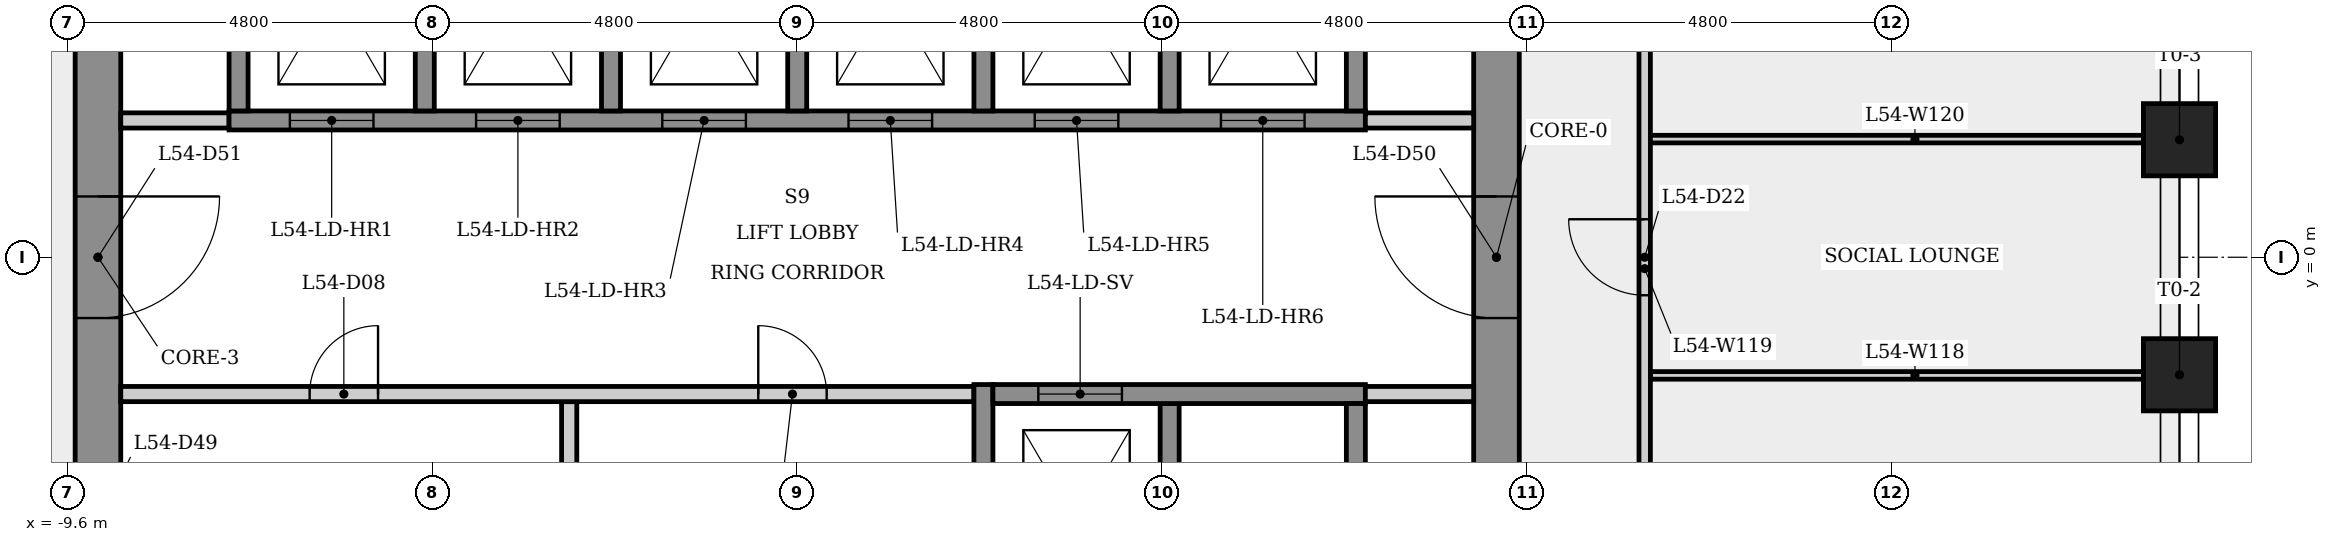
"""IFC4 building model, lengths in metres.
Left out: names, types, materials, properties, quantities, classifications, styles, units other than length and angle.
Written with IfcOpenShell. Run it as: python <this file> out.ifc"""

import sys

from ifc_helpers import new_model, si_unit, direction, frame, frame_2d, origin, origin_2d, place, context, subcontext, project, spatial, rectangle, extrude, element, fill, save


model = new_model("IFC4")
c1 = context("Model", 3, precision=1e-05, world=origin(), true_north=direction((0.0, 1.0)))
c2 = subcontext(c1, "Body", "Model", "MODEL_VIEW")
j1 = project(units=[si_unit("LENGTHUNIT", "METRE"), si_unit("PLANEANGLEUNIT", "RADIAN")], contexts=[c1])
p1 = place(None, origin())
s1 = spatial("IfcSite", under=j1, at=p1, CompositionType="ELEMENT")
p2 = place(p1, origin())
s2 = spatial("IfcBuilding", under=s1, at=p2, CompositionType="ELEMENT")
p3 = place(p2, frame((0.0, 0.0, 202.1)))
s3 = spatial("IfcBuildingStorey", under=s2, at=p3, CompositionType="ELEMENT", Elevation=202.1)
p4 = place(p3, frame((9.2, -5.485, 0.0), z_axis=(0.0, 0.0, 1.0), x_axis=(0.0, 1.0, 0.0)))
e1 = element("IfcWall", 1, at=p4, inside=s3, PredefinedType="SHEAR", context=c2, shape_type="SweptSolid", body=[
    extrude(rectangle(XDim=10.97, YDim=0.6, at=frame_2d((5.485, 0.0))), origin(), (0.0, 0.0, 1.0), 4.0),
])
p5 = place(p4, frame((4.685, 0.0, 0.0)))
e2 = element("IfcOpeningElement", 2, at=p5, cuts=e1, PredefinedType="OPENING", context=c2, shape_type="SweptSolid", body=[
    extrude(rectangle(XDim=1.6, YDim=2.1, at=frame_2d((0.8, 1.05))), frame((0.0, 0.31, 0.0), z_axis=(0.0, -1.0, 0.0), x_axis=(1.0, 0.0, 0.0)), (0.0, 0.0, 1.0), 0.62),
])
p6 = place(p3, frame((-9.2, 5.485, 0.0), z_axis=(0.0, 0.0, 1.0), x_axis=(0.0, -1.0, 0.0)))
e3 = element("IfcWall", 3, at=p6, inside=s3, PredefinedType="SHEAR", context=c2, shape_type="SweptSolid", body=[
    extrude(rectangle(XDim=10.97, YDim=0.6, at=frame_2d((5.485, 0.0))), origin(), (0.0, 0.0, 1.0), 4.0),
])
p7 = place(p6, frame((8.516, 0.0, 0.0)))
e4 = element("IfcOpeningElement", 4, at=p7, cuts=e3, PredefinedType="OPENING", context=c2, shape_type="SweptSolid", body=[
    extrude(rectangle(XDim=0.9, YDim=2.1, at=frame_2d((0.45, 1.05))), frame((0.0, 0.31, 0.0), z_axis=(0.0, -1.0, 0.0), x_axis=(1.0, 0.0, 0.0)), (0.0, 0.0, 1.0), 0.62),
])
p8 = place(p6, frame((4.685, 0.0, 0.0)))
e5 = element("IfcOpeningElement", 5, at=p8, cuts=e3, PredefinedType="OPENING", context=c2, shape_type="SweptSolid", body=[
    extrude(rectangle(XDim=1.6, YDim=2.1, at=frame_2d((0.8, 1.05))), frame((0.0, 0.31, 0.0), z_axis=(0.0, -1.0, 0.0), x_axis=(1.0, 0.0, 0.0)), (0.0, 0.0, 1.0), 0.62),
])
for number, where, z_axis, x_axis in (
    (6, (18.187, -1.546, 0.0), (0.0, 0.0, 1.0), (1.0, 0.0, 0.0)),
    (7, (18.187, 1.546, 0.0), (0.0, 0.0, 1.0), (1.0, 0.0, 0.0)),
):
    element("IfcColumn", number, at=place(p3, frame(where, z_axis=z_axis, x_axis=x_axis)), inside=s3, PredefinedType="COLUMN", context=c2, shape_type="SweptSolid", body=[
        extrude(rectangle(XDim=0.95, YDim=0.95, at=origin_2d()), origin(), (0.0, 0.0, 1.0), 4.0),
    ])
p9 = place(p3, frame((-8.9, 1.8, 0.0), z_axis=(0.0, 0.0, 1.0), x_axis=(1.0, 0.0, 0.0)))
e8 = element("IfcWall", 8, at=p9, inside=s3, PredefinedType="PARTITIONING", context=c2, shape_type="SweptSolid", body=[
    extrude(rectangle(XDim=1.425, YDim=0.2, at=frame_2d((0.712, 0.0))), origin(), (0.0, 0.0, 1.0), 3.6),
])
p10 = place(p3, frame((-7.475, 1.8, 0.0), z_axis=(0.0, 0.0, 1.0), x_axis=(1.0, 0.0, 0.0)))
e9 = element("IfcWall", 9, at=p10, inside=s3, PredefinedType="SHEAR", context=c2, shape_type="SweptSolid", body=[
    extrude(rectangle(XDim=14.95, YDim=0.25, at=frame_2d((7.475, 0.0))), origin(), (0.0, 0.0, 1.0), 3.6),
])
p11 = place(p10, frame((0.8, 0.0, 0.0)))
e10 = element("IfcOpeningElement", 10, at=p11, cuts=e9, PredefinedType="OPENING", context=c2, shape_type="SweptSolid", body=[
    extrude(rectangle(XDim=1.1, YDim=2.1, at=frame_2d((0.55, 1.05))), frame((0.0, 0.135, 0.0), z_axis=(0.0, -1.0, 0.0), x_axis=(1.0, 0.0, 0.0)), (0.0, 0.0, 1.0), 0.27),
])
p12 = place(p10, frame((3.25, 0.0, 0.0)))
e11 = element("IfcOpeningElement", 11, at=p12, cuts=e9, PredefinedType="OPENING", context=c2, shape_type="SweptSolid", body=[
    extrude(rectangle(XDim=1.1, YDim=2.1, at=frame_2d((0.55, 1.05))), frame((0.0, 0.135, 0.0), z_axis=(0.0, -1.0, 0.0), x_axis=(1.0, 0.0, 0.0)), (0.0, 0.0, 1.0), 0.27),
])
p13 = place(p10, frame((5.7, 0.0, 0.0)))
e12 = element("IfcOpeningElement", 12, at=p13, cuts=e9, PredefinedType="OPENING", context=c2, shape_type="SweptSolid", body=[
    extrude(rectangle(XDim=1.1, YDim=2.1, at=frame_2d((0.55, 1.05))), frame((0.0, 0.135, 0.0), z_axis=(0.0, -1.0, 0.0), x_axis=(1.0, 0.0, 0.0)), (0.0, 0.0, 1.0), 0.27),
])
p14 = place(p10, frame((8.15, 0.0, 0.0)))
e13 = element("IfcOpeningElement", 13, at=p14, cuts=e9, PredefinedType="OPENING", context=c2, shape_type="SweptSolid", body=[
    extrude(rectangle(XDim=1.1, YDim=2.1, at=frame_2d((0.55, 1.05))), frame((0.0, 0.135, 0.0), z_axis=(0.0, -1.0, 0.0), x_axis=(1.0, 0.0, 0.0)), (0.0, 0.0, 1.0), 0.27),
])
p15 = place(p10, frame((10.6, 0.0, 0.0)))
e14 = element("IfcOpeningElement", 14, at=p15, cuts=e9, PredefinedType="OPENING", context=c2, shape_type="SweptSolid", body=[
    extrude(rectangle(XDim=1.1, YDim=2.1, at=frame_2d((0.55, 1.05))), frame((0.0, 0.135, 0.0), z_axis=(0.0, -1.0, 0.0), x_axis=(1.0, 0.0, 0.0)), (0.0, 0.0, 1.0), 0.27),
])
p16 = place(p10, frame((13.05, 0.0, 0.0)))
e15 = element("IfcOpeningElement", 15, at=p16, cuts=e9, PredefinedType="OPENING", context=c2, shape_type="SweptSolid", body=[
    extrude(rectangle(XDim=1.1, YDim=2.1, at=frame_2d((0.55, 1.05))), frame((0.0, 0.135, 0.0), z_axis=(0.0, -1.0, 0.0), x_axis=(1.0, 0.0, 0.0)), (0.0, 0.0, 1.0), 0.27),
])
p17 = place(p3, frame((-7.35, 1.925, 0.0), z_axis=(0.0, 0.0, 1.0), x_axis=(0.0, 1.0, 0.0)))
e16 = element("IfcWall", 16, at=p17, inside=s3, PredefinedType="SHEAR", context=c2, shape_type="SweptSolid", body=[
    extrude(rectangle(XDim=4.036, YDim=0.25, at=frame_2d((2.018, 0.0))), origin(), (0.0, 0.0, 1.0), 3.6),
])
p18 = place(p3, frame((-4.9, 5.025, 0.0), z_axis=(0.0, 0.0, 1.0), x_axis=(0.0, -1.0, 0.0)))
e17 = element("IfcWall", 17, at=p18, inside=s3, PredefinedType="SHEAR", context=c2, shape_type="SweptSolid", body=[
    extrude(rectangle(XDim=3.1, YDim=0.25, at=frame_2d((1.55, 0.0))), origin(), (0.0, 0.0, 1.0), 4.0),
])
p19 = place(p3, frame((-3.0, -1.9, 0.0), z_axis=(0.0, 0.0, 1.0), x_axis=(0.0, -1.0, 0.0)))
e18 = element("IfcWall", 18, at=p19, inside=s3, PredefinedType="PARTITIONING", context=c2, shape_type="SweptSolid", body=[
    extrude(rectangle(XDim=3.15, YDim=0.2, at=frame_2d((1.575, 0.0))), origin(), (0.0, 0.0, 1.0), 3.6),
])
p20 = place(p3, frame((-8.9, -1.8, 0.0), z_axis=(0.0, 0.0, 1.0), x_axis=(1.0, 0.0, 0.0)))
e19 = element("IfcWall", 19, at=p20, inside=s3, PredefinedType="PARTITIONING", context=c2, shape_type="SweptSolid", body=[
    extrude(rectangle(XDim=11.225, YDim=0.2, at=frame_2d((5.613, 0.0))), origin(), (0.0, 0.0, 1.0), 3.6),
])
p21 = place(p20, frame((2.485, 0.0, 0.0)))
e20 = element("IfcOpeningElement", 20, at=p21, cuts=e19, PredefinedType="OPENING", context=c2, shape_type="SweptSolid", body=[
    extrude(rectangle(XDim=0.9, YDim=2.1, at=frame_2d((0.45, 1.05))), frame((0.0, 0.11, 0.0), z_axis=(0.0, -1.0, 0.0), x_axis=(1.0, 0.0, 0.0)), (0.0, 0.0, 1.0), 0.22),
])
p22 = place(p20, frame((8.387, 0.0, 0.0)))
e21 = element("IfcOpeningElement", 21, at=p22, cuts=e19, PredefinedType="OPENING", context=c2, shape_type="SweptSolid", body=[
    extrude(rectangle(XDim=0.9, YDim=2.1, at=frame_2d((0.45, 1.05))), frame((0.0, 0.11, 0.0), z_axis=(0.0, -1.0, 0.0), x_axis=(1.0, 0.0, 0.0)), (0.0, 0.0, 1.0), 0.22),
])
for number, where, z_axis, x_axis in (
    (22, (-2.45, 5.025, 0.0), (0.0, 0.0, 1.0), (0.0, -1.0, 0.0)),
    (23, (0.0, 5.025, 0.0), (0.0, 0.0, 1.0), (0.0, -1.0, 0.0)),
):
    element("IfcWall", number, at=place(p3, frame(where, z_axis=z_axis, x_axis=x_axis)), inside=s3, PredefinedType="SHEAR", context=c2, shape_type="SweptSolid", body=[
        extrude(rectangle(XDim=3.1, YDim=0.25, at=frame_2d((1.55, 0.0))), origin(), (0.0, 0.0, 1.0), 4.0),
    ])
p23 = place(p3, frame((2.45, -5.275, 0.0), z_axis=(0.0, 0.0, 1.0), x_axis=(0.0, 1.0, 0.0)))
e24 = element("IfcWall", 24, at=p23, inside=s3, PredefinedType="SHEAR", context=c2, shape_type="SweptSolid", body=[
    extrude(rectangle(XDim=3.6, YDim=0.25, at=frame_2d((1.8, 0.0))), origin(), (0.0, 0.0, 1.0), 3.6),
])
for number, where, z_axis, x_axis in (
    (25, (2.45, 5.025, 0.0), (0.0, 0.0, 1.0), (0.0, -1.0, 0.0)),
    (26, (4.9, -1.925, 0.0), (0.0, 0.0, 1.0), (0.0, -1.0, 0.0)),
    (27, (4.9, 5.025, 0.0), (0.0, 0.0, 1.0), (0.0, -1.0, 0.0)),
):
    element("IfcWall", number, at=place(p3, frame(where, z_axis=z_axis, x_axis=x_axis)), inside=s3, PredefinedType="SHEAR", context=c2, shape_type="SweptSolid", body=[
        extrude(rectangle(XDim=3.1, YDim=0.25, at=frame_2d((1.55, 0.0))), origin(), (0.0, 0.0, 1.0), 4.0),
    ])
p24 = place(p3, frame((2.575, -1.8, 0.0), z_axis=(0.0, 0.0, 1.0), x_axis=(1.0, 0.0, 0.0)))
e28 = element("IfcWall", 28, at=p24, inside=s3, PredefinedType="SHEAR", context=c2, shape_type="SweptSolid", body=[
    extrude(rectangle(XDim=4.9, YDim=0.25, at=frame_2d((2.45, 0.0))), origin(), (0.0, 0.0, 1.0), 3.6),
])
p25 = place(p24, frame((0.597, 0.0, 0.0)))
e29 = element("IfcOpeningElement", 29, at=p25, cuts=e28, PredefinedType="OPENING", context=c2, shape_type="SweptSolid", body=[
    extrude(rectangle(XDim=1.1, YDim=2.1, at=frame_2d((0.55, 1.05))), frame((0.0, 0.135, 0.0), z_axis=(0.0, -1.0, 0.0), x_axis=(1.0, 0.0, 0.0)), (0.0, 0.0, 1.0), 0.27),
])
p26 = place(p3, frame((7.475, 1.8, 0.0), z_axis=(0.0, 0.0, 1.0), x_axis=(1.0, 0.0, 0.0)))
e30 = element("IfcWall", 30, at=p26, inside=s3, PredefinedType="PARTITIONING", context=c2, shape_type="SweptSolid", body=[
    extrude(rectangle(XDim=1.425, YDim=0.2, at=frame_2d((0.712, 0.0))), origin(), (0.0, 0.0, 1.0), 3.6),
])
for number, where, z_axis, x_axis in (
    (31, (7.35, -1.925, 0.0), (0.0, 0.0, 1.0), (0.0, -1.0, 0.0)),
    (32, (7.35, 5.025, 0.0), (0.0, 0.0, 1.0), (0.0, -1.0, 0.0)),
):
    element("IfcWall", number, at=place(p3, frame(where, z_axis=z_axis, x_axis=x_axis)), inside=s3, PredefinedType="SHEAR", context=c2, shape_type="SweptSolid", body=[
        extrude(rectangle(XDim=3.1, YDim=0.25, at=frame_2d((1.55, 0.0))), origin(), (0.0, 0.0, 1.0), 4.0),
    ])
p27 = place(p3, frame((8.9, -1.8, 0.0), z_axis=(0.0, 0.0, 1.0), x_axis=(-1.0, 0.0, 0.0)))
e33 = element("IfcWall", 33, at=p27, inside=s3, PredefinedType="PARTITIONING", context=c2, shape_type="SweptSolid", body=[
    extrude(rectangle(XDim=1.425, YDim=0.2, at=frame_2d((0.712, 0.0))), origin(), (0.0, 0.0, 1.0), 3.6),
])
p28 = place(p3, frame((11.225, -1.554, 0.0), z_axis=(0.0, 0.0, 1.0), x_axis=(1.0, 0.0, 0.0)))
e34 = element("IfcWall", 34, at=p28, inside=s3, PredefinedType="PARTITIONING", context=c2, shape_type="SweptSolid", body=[
    extrude(rectangle(XDim=6.961, YDim=0.1, at=frame_2d((3.481, 0.0))), origin(), (0.0, 0.0, 1.0), 3.6),
])
p29 = place(p3, frame((11.15, -4.588, 0.0), z_axis=(0.0, 0.0, 1.0), x_axis=(0.0, 1.0, 0.0)))
e35 = element("IfcWall", 35, at=p29, inside=s3, PredefinedType="PARTITIONING", context=c2, shape_type="SweptSolid", body=[
    extrude(rectangle(XDim=8.877, YDim=0.15, at=frame_2d((4.438, 0.0))), origin(), (0.0, 0.0, 1.0), 3.6),
])
p30 = place(p29, frame((4.088, 0.0, 0.0)))
e36 = element("IfcOpeningElement", 36, at=p30, cuts=e35, PredefinedType="OPENING", context=c2, shape_type="SweptSolid", body=[
    extrude(rectangle(XDim=1.0, YDim=2.1, at=frame_2d((0.5, 1.05))), frame((0.0, 0.085, 0.0), z_axis=(0.0, -1.0, 0.0), x_axis=(1.0, 0.0, 0.0)), (0.0, 0.0, 1.0), 0.17),
])
p31 = place(p3, frame((11.225, 1.554, 0.0), z_axis=(0.0, 0.0, 1.0), x_axis=(1.0, 0.0, 0.0)))
e37 = element("IfcWall", 37, at=p31, inside=s3, PredefinedType="PARTITIONING", context=c2, shape_type="SweptSolid", body=[
    extrude(rectangle(XDim=6.961, YDim=0.1, at=frame_2d((3.481, 0.0))), origin(), (0.0, 0.0, 1.0), 3.6),
])
p32 = place(p11, origin())
e38 = element("IfcDoor", 38, at=p32, inside=s3, OperationType="SLIDING_TO_LEFT", PredefinedType="DOOR", context=c2, shape_type="SweptSolid", body=[
    extrude(rectangle(XDim=1.1, YDim=2.1, at=frame_2d((0.55, 1.05))), frame((0.0, 0.025, 0.0), z_axis=(0.0, -1.0, 0.0), x_axis=(1.0, 0.0, 0.0)), (0.0, 0.0, 1.0), 0.05),
])
fill(e10, e38)
p33 = place(p12, origin())
e39 = element("IfcDoor", 39, at=p33, inside=s3, OperationType="SLIDING_TO_LEFT", PredefinedType="DOOR", context=c2, shape_type="SweptSolid", body=[
    extrude(rectangle(XDim=1.1, YDim=2.1, at=frame_2d((0.55, 1.05))), frame((0.0, 0.025, 0.0), z_axis=(0.0, -1.0, 0.0), x_axis=(1.0, 0.0, 0.0)), (0.0, 0.0, 1.0), 0.05),
])
fill(e11, e39)
p34 = place(p13, origin())
e40 = element("IfcDoor", 40, at=p34, inside=s3, OperationType="SLIDING_TO_LEFT", PredefinedType="DOOR", context=c2, shape_type="SweptSolid", body=[
    extrude(rectangle(XDim=1.1, YDim=2.1, at=frame_2d((0.55, 1.05))), frame((0.0, 0.025, 0.0), z_axis=(0.0, -1.0, 0.0), x_axis=(1.0, 0.0, 0.0)), (0.0, 0.0, 1.0), 0.05),
])
fill(e12, e40)
p35 = place(p14, origin())
e41 = element("IfcDoor", 41, at=p35, inside=s3, OperationType="SLIDING_TO_LEFT", PredefinedType="DOOR", context=c2, shape_type="SweptSolid", body=[
    extrude(rectangle(XDim=1.1, YDim=2.1, at=frame_2d((0.55, 1.05))), frame((0.0, 0.025, 0.0), z_axis=(0.0, -1.0, 0.0), x_axis=(1.0, 0.0, 0.0)), (0.0, 0.0, 1.0), 0.05),
])
fill(e13, e41)
p36 = place(p15, origin())
e42 = element("IfcDoor", 42, at=p36, inside=s3, OperationType="SLIDING_TO_LEFT", PredefinedType="DOOR", context=c2, shape_type="SweptSolid", body=[
    extrude(rectangle(XDim=1.1, YDim=2.1, at=frame_2d((0.55, 1.05))), frame((0.0, 0.025, 0.0), z_axis=(0.0, -1.0, 0.0), x_axis=(1.0, 0.0, 0.0)), (0.0, 0.0, 1.0), 0.05),
])
fill(e14, e42)
p37 = place(p16, origin())
e43 = element("IfcDoor", 43, at=p37, inside=s3, OperationType="SLIDING_TO_LEFT", PredefinedType="DOOR", context=c2, shape_type="SweptSolid", body=[
    extrude(rectangle(XDim=1.1, YDim=2.1, at=frame_2d((0.55, 1.05))), frame((0.0, 0.025, 0.0), z_axis=(0.0, -1.0, 0.0), x_axis=(1.0, 0.0, 0.0)), (0.0, 0.0, 1.0), 0.05),
])
fill(e15, e43)
p38 = place(p25, origin())
e44 = element("IfcDoor", 44, at=p38, inside=s3, OperationType="SLIDING_TO_LEFT", PredefinedType="DOOR", context=c2, shape_type="SweptSolid", body=[
    extrude(rectangle(XDim=1.1, YDim=2.1, at=frame_2d((0.55, 1.05))), frame((0.0, 0.025, 0.0), z_axis=(0.0, -1.0, 0.0), x_axis=(1.0, 0.0, 0.0)), (0.0, 0.0, 1.0), 0.05),
])
fill(e29, e44)
p39 = place(p21, origin())
e45 = element("IfcDoor", 45, at=p39, inside=s3, OperationType="SINGLE_SWING_RIGHT", PredefinedType="DOOR", context=c2, shape_type="SweptSolid", body=[
    extrude(rectangle(XDim=0.9, YDim=2.1, at=frame_2d((0.45, 1.05))), frame((0.0, 0.025, 0.0), z_axis=(0.0, -1.0, 0.0), x_axis=(1.0, 0.0, 0.0)), (0.0, 0.0, 1.0), 0.05),
])
fill(e20, e45)
p40 = place(p22, origin())
e46 = element("IfcDoor", 46, at=p40, inside=s3, OperationType="SINGLE_SWING_LEFT", PredefinedType="DOOR", context=c2, shape_type="SweptSolid", body=[
    extrude(rectangle(XDim=0.9, YDim=2.1, at=frame_2d((0.45, 1.05))), frame((0.0, 0.025, 0.0), z_axis=(0.0, -1.0, 0.0), x_axis=(1.0, 0.0, 0.0)), (0.0, 0.0, 1.0), 0.05),
])
fill(e21, e46)
p41 = place(p30, origin())
e47 = element("IfcDoor", 47, at=p41, inside=s3, OperationType="SINGLE_SWING_RIGHT", PredefinedType="DOOR", context=c2, shape_type="SweptSolid", body=[
    extrude(rectangle(XDim=1.0, YDim=2.1, at=frame_2d((0.5, 1.05))), frame((0.0, 0.025, 0.0), z_axis=(0.0, -1.0, 0.0), x_axis=(1.0, 0.0, 0.0)), (0.0, 0.0, 1.0), 0.05),
])
fill(e36, e47)
p42 = place(p5, origin())
e48 = element("IfcDoor", 48, at=p42, inside=s3, OperationType="SINGLE_SWING_RIGHT", PredefinedType="DOOR", context=c2, shape_type="SweptSolid", body=[
    extrude(rectangle(XDim=1.6, YDim=2.1, at=frame_2d((0.8, 1.05))), frame((0.0, 0.025, 0.0), z_axis=(0.0, -1.0, 0.0), x_axis=(1.0, 0.0, 0.0)), (0.0, 0.0, 1.0), 0.05),
])
fill(e2, e48)
p43 = place(p8, origin())
e49 = element("IfcDoor", 49, at=p43, inside=s3, OperationType="SINGLE_SWING_LEFT", PredefinedType="DOOR", context=c2, shape_type="SweptSolid", body=[
    extrude(rectangle(XDim=1.6, YDim=2.1, at=frame_2d((0.8, 1.05))), frame((0.0, 0.025, 0.0), z_axis=(0.0, -1.0, 0.0), x_axis=(1.0, 0.0, 0.0)), (0.0, 0.0, 1.0), 0.05),
])
fill(e5, e49)
save(model, sys.argv[1])
